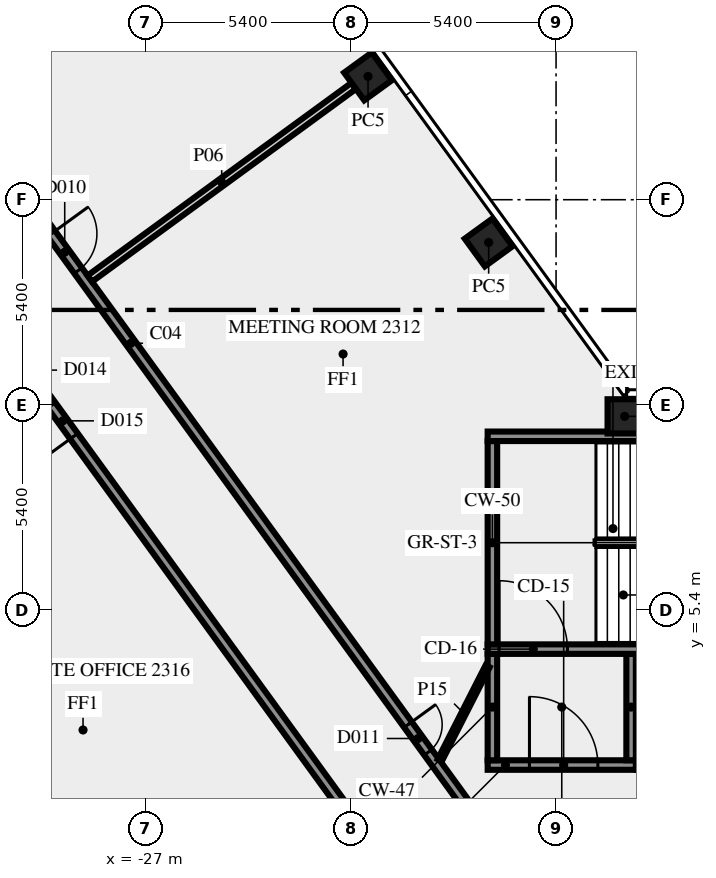
"""IFC4 building model, lengths in metres.
Left out: names, types, materials, properties, quantities, classifications, styles, units other than length and angle.
Written with IfcOpenShell. Run it as: python <this file> out.ifc"""

import sys

from ifc_helpers import new_model, si_unit, direction, frame, frame_2d, origin, origin_2d, place, context, subcontext, project, spatial, rectangle, extrude, element, fill, save


model = new_model("IFC4")
c1 = context("Model", 3, precision=1e-05, world=origin(), true_north=direction((0.0, 1.0)))
c2 = subcontext(c1, "Body", "Model", "MODEL_VIEW")
j1 = project(units=[si_unit("LENGTHUNIT", "METRE"), si_unit("PLANEANGLEUNIT", "RADIAN")], contexts=[c1])
p1 = place(None, origin())
s1 = spatial("IfcSite", under=j1, at=p1, CompositionType="ELEMENT")
p2 = place(p1, origin())
s2 = spatial("IfcBuilding", under=s1, at=p2, CompositionType="ELEMENT")
p3 = place(p2, frame((0.0, 0.0, 101.0)))
s3 = spatial("IfcBuildingStorey", under=s2, at=p3, CompositionType="ELEMENT", Elevation=101.0)
for number, where, z_axis, x_axis in (
    (1, (-17.974, 15.075, 0.0), (0.0, 0.0, 1.0), (-0.588, 0.809, 0.0)),
    (2, (-21.147, 19.444, 0.0), (0.0, 0.0, 1.0), (-0.588, 0.809, 0.0)),
    (3, (-14.395, 10.5, 0.0), (0.0, 0.0, 1.0), (-1.0, 0.0, 0.0)),
):
    element("IfcColumn", number, at=place(p3, frame(where, z_axis=z_axis, x_axis=x_axis)), inside=s3, PredefinedType="COLUMN", context=c2, shape_type="SweptSolid", body=[
        extrude(rectangle(XDim=0.9, YDim=0.9, at=origin_2d()), origin(), (0.0, 0.0, 1.0), 3.65),
    ])
p4 = place(p3, frame((-18.0, 1.325, 0.0), z_axis=(0.0, 0.0, 1.0), x_axis=(1.0, 0.0, 0.0)))
e4 = element("IfcWall", 4, at=p4, inside=s3, PredefinedType="SHEAR", context=c2, shape_type="SweptSolid", body=[
    extrude(rectangle(XDim=3.9, YDim=0.25, at=frame_2d((1.95, 0.0))), origin(), (0.0, 0.0, 1.0), 3.65),
])
p5 = place(p4, frame((1.1, 0.0, 0.0)))
e5 = element("IfcOpeningElement", 5, at=p5, cuts=e4, PredefinedType="OPENING", context=c2, shape_type="SweptSolid", body=[
    extrude(rectangle(XDim=1.8, YDim=2.1, at=frame_2d((0.9, 1.05))), frame((0.0, 0.135, 0.0), z_axis=(0.0, -1.0, 0.0), x_axis=(1.0, 0.0, 0.0)), (0.0, 0.0, 1.0), 0.27),
])
for number, where, z_axis, x_axis in (
    (6, (-17.875, 1.45, 0.0), (0.0, 0.0, 1.0), (0.0, 1.0, 0.0)),
    (7, (-14.225, 1.45, 0.0), (0.0, 0.0, 1.0), (0.0, 1.0, 0.0)),
):
    element("IfcWall", number, at=place(p3, frame(where, z_axis=z_axis, x_axis=x_axis)), inside=s3, PredefinedType="SHEAR", context=c2, shape_type="SweptSolid", body=[
        extrude(rectangle(XDim=2.8, YDim=0.25, at=frame_2d((1.4, 0.0))), origin(), (0.0, 0.0, 1.0), 3.65),
    ])
p6 = place(p3, frame((-18.0, 4.375, 0.0), z_axis=(0.0, 0.0, 1.0), x_axis=(1.0, 0.0, 0.0)))
e8 = element("IfcWall", 8, at=p6, inside=s3, PredefinedType="SHEAR", context=c2, shape_type="SweptSolid", body=[
    extrude(rectangle(XDim=10.5, YDim=0.25, at=frame_2d((5.25, 0.0))), origin(), (0.0, 0.0, 1.0), 3.65),
])
p7 = place(p6, frame((0.3, 0.0, 0.0)))
e9 = element("IfcOpeningElement", 9, at=p7, cuts=e8, PredefinedType="OPENING", context=c2, shape_type="SweptSolid", body=[
    extrude(rectangle(XDim=1.8, YDim=2.1, at=frame_2d((0.9, 1.05))), frame((0.0, 0.135, 0.0), z_axis=(0.0, -1.0, 0.0), x_axis=(1.0, 0.0, 0.0)), (0.0, 0.0, 1.0), 0.27),
])
p8 = place(p3, frame((-17.875, 4.5, 0.0), z_axis=(0.0, 0.0, 1.0), x_axis=(0.0, 1.0, 0.0)))
e10 = element("IfcWall", 10, at=p8, inside=s3, PredefinedType="SHEAR", context=c2, shape_type="SweptSolid", body=[
    extrude(rectangle(XDim=5.35, YDim=0.25, at=frame_2d((2.675, 0.0))), origin(), (0.0, 0.0, 1.0), 3.65),
])
p9 = place(p3, frame((-18.0, 9.975, 0.0), z_axis=(0.0, 0.0, 1.0), x_axis=(1.0, 0.0, 0.0)))
e11 = element("IfcWall", 11, at=p9, inside=s3, PredefinedType="SHEAR", context=c2, shape_type="SweptSolid", body=[
    extrude(rectangle(XDim=10.5, YDim=0.25, at=frame_2d((5.25, 0.0))), origin(), (0.0, 0.0, 1.0), 3.65),
])
p10 = place(p9, frame((4.5, 0.0, 1.0)))
e12 = element("IfcOpeningElement", 12, at=p10, cuts=e11, PredefinedType="OPENING", context=c2, shape_type="SweptSolid", body=[
    extrude(rectangle(XDim=1.2, YDim=1.2, at=frame_2d((0.6, 0.6))), frame((0.0, 0.135, 0.0), z_axis=(0.0, -1.0, 0.0), x_axis=(1.0, 0.0, 0.0)), (0.0, 0.0, 1.0), 0.27),
])
p11 = place(p3, frame((-20.531, -1.523, 0.0), z_axis=(0.0, 0.0, 1.0), x_axis=(-0.587784593204, 0.809017473231, 0.0)))
e13 = element("IfcWall", 13, at=p11, inside=s3, PredefinedType="SOLIDWALL", context=c2, shape_type="SweptSolid", body=[
    extrude(rectangle(XDim=44.67, YDim=0.25, at=frame_2d((22.335, 0.0))), origin(), (0.0, 0.0, 1.0), 3.65),
])
p12 = place(p11, frame((43.296, 0.0, 0.0)))
e14 = element("IfcOpeningElement", 14, at=p12, cuts=e13, PredefinedType="OPENING", context=c2, shape_type="SweptSolid", body=[
    extrude(rectangle(XDim=0.9, YDim=2.1, at=frame_2d((0.45, 1.05))), frame((0.0, 0.135, 0.0), z_axis=(0.0, -1.0, 0.0), x_axis=(1.0, 0.0, 0.0)), (0.0, 0.0, 1.0), 0.27),
])
p13 = place(p11, frame((15.916, 0.0, 0.0)))
e15 = element("IfcOpeningElement", 15, at=p13, cuts=e13, PredefinedType="OPENING", context=c2, shape_type="SweptSolid", body=[
    extrude(rectangle(XDim=0.9, YDim=2.1, at=frame_2d((0.45, 1.05))), frame((0.0, 0.135, 0.0), z_axis=(0.0, -1.0, 0.0), x_axis=(1.0, 0.0, 0.0)), (0.0, 0.0, 1.0), 0.27),
])
p14 = place(p11, frame((33.116, 0.0, 0.0)))
e16 = element("IfcOpeningElement", 16, at=p14, cuts=e13, PredefinedType="OPENING", context=c2, shape_type="SweptSolid", body=[
    extrude(rectangle(XDim=1.0, YDim=2.1, at=frame_2d((0.5, 1.05))), frame((0.0, 0.135, 0.0), z_axis=(0.0, -1.0, 0.0), x_axis=(1.0, 0.0, 0.0)), (0.0, 0.0, 1.0), 0.27),
])
p15 = place(p11, frame((14.216, 0.0, 0.0)))
e17 = element("IfcOpeningElement", 17, at=p15, cuts=e13, PredefinedType="OPENING", context=c2, shape_type="SweptSolid", body=[
    extrude(rectangle(XDim=1.0, YDim=2.1, at=frame_2d((0.5, 1.05))), frame((0.0, 0.135, 0.0), z_axis=(0.0, -1.0, 0.0), x_axis=(1.0, 0.0, 0.0)), (0.0, 0.0, 1.0), 0.27),
])
p16 = place(p3, frame((-37.232, 25.972, 0.0), z_axis=(0.0, 0.0, 1.0), x_axis=(0.587786323093, -0.809016216391, 0.0)))
e18 = element("IfcWall", 18, at=p16, inside=s3, PredefinedType="SOLIDWALL", context=c2, shape_type="SweptSolid", body=[
    extrude(rectangle(XDim=33.493, YDim=0.25, at=frame_2d((16.747, 0.0))), origin(), (0.0, 0.0, 1.0), 3.65),
])
p17 = place(p16, frame((13.185, 0.0, 0.0)))
e19 = element("IfcOpeningElement", 19, at=p17, cuts=e18, PredefinedType="OPENING", context=c2, shape_type="SweptSolid", body=[
    extrude(rectangle(XDim=1.2, YDim=2.1, at=frame_2d((0.6, 1.05))), frame((0.0, 0.135, 0.0), z_axis=(0.0, -1.0, 0.0), x_axis=(1.0, 0.0, 0.0)), (0.0, 0.0, 1.0), 0.27),
])
p18 = place(p16, frame((29.152, 0.0, 0.0)))
e20 = element("IfcOpeningElement", 20, at=p18, cuts=e18, PredefinedType="OPENING", context=c2, shape_type="SweptSolid", body=[
    extrude(rectangle(XDim=0.9, YDim=2.1, at=frame_2d((0.45, 1.05))), frame((0.0, 0.135, 0.0), z_axis=(0.0, -1.0, 0.0), x_axis=(1.0, 0.0, 0.0)), (0.0, 0.0, 1.0), 0.27),
])
p19 = place(p3, frame((-28.469, 14.124, 0.0), z_axis=(0.0, 0.0, 1.0), x_axis=(0.807597163234, 0.589734535139, 0.0)))
e21 = element("IfcWall", 21, at=p19, inside=s3, PredefinedType="SOLIDWALL", context=c2, shape_type="SweptSolid", body=[
    extrude(rectangle(XDim=8.595, YDim=0.2, at=frame_2d((4.298, 0.0))), origin(), (0.0, 0.0, 1.0), 3.65),
])
p20 = place(p3, frame((-19.261, 1.45, 0.0), z_axis=(0.0, 0.0, 1.0), x_axis=(0.453950796792, 0.891026752736, 0.0)))
e22 = element("IfcWall", 22, at=p20, inside=s3, PredefinedType="PARTITIONING", context=c2, shape_type="SweptSolid", body=[
    extrude(rectangle(XDim=2.778, YDim=0.12, at=frame_2d((1.389, 0.0))), origin(), (0.0, 0.0, 1.0), 3.65),
])
p21 = place(p5, origin())
e23 = element("IfcDoor", 23, at=p21, inside=s3, OperationType="DOUBLE_DOOR_SINGLE_SWING", PredefinedType="DOOR", context=c2, shape_type="SweptSolid", body=[
    extrude(rectangle(XDim=1.8, YDim=2.1, at=frame_2d((0.9, 1.05))), frame((0.0, 0.025, 0.0), z_axis=(0.0, -1.0, 0.0), x_axis=(1.0, 0.0, 0.0)), (0.0, 0.0, 1.0), 0.05),
])
fill(e5, e23)
p22 = place(p7, origin())
e24 = element("IfcDoor", 24, at=p22, inside=s3, OperationType="DOUBLE_DOOR_SINGLE_SWING", PredefinedType="DOOR", context=c2, shape_type="SweptSolid", body=[
    extrude(rectangle(XDim=1.8, YDim=2.1, at=frame_2d((0.9, 1.05))), frame((0.0, 0.025, 0.0), z_axis=(0.0, -1.0, 0.0), x_axis=(1.0, 0.0, 0.0)), (0.0, 0.0, 1.0), 0.05),
])
fill(e9, e24)
p23 = place(p17, origin())
e25 = element("IfcDoor", 25, at=p23, inside=s3, OperationType="SINGLE_SWING_RIGHT", PredefinedType="DOOR", context=c2, shape_type="SweptSolid", body=[
    extrude(rectangle(XDim=1.2, YDim=2.1, at=frame_2d((0.6, 1.05))), frame((0.0, 0.025, 0.0), z_axis=(0.0, -1.0, 0.0), x_axis=(1.0, 0.0, 0.0)), (0.0, 0.0, 1.0), 0.05),
])
fill(e19, e25)
p24 = place(p15, origin())
e26 = element("IfcDoor", 26, at=p24, inside=s3, OperationType="SINGLE_SWING_RIGHT", PredefinedType="DOOR", context=c2, shape_type="SweptSolid", body=[
    extrude(rectangle(XDim=1.0, YDim=2.1, at=frame_2d((0.5, 1.05))), frame((0.0, 0.025, 0.0), z_axis=(0.0, -1.0, 0.0), x_axis=(1.0, 0.0, 0.0)), (0.0, 0.0, 1.0), 0.05),
])
fill(e17, e26)
p25 = place(p18, origin())
e27 = element("IfcDoor", 27, at=p25, inside=s3, OperationType="SINGLE_SWING_RIGHT", PredefinedType="DOOR", context=c2, shape_type="SweptSolid", body=[
    extrude(rectangle(XDim=0.9, YDim=2.1, at=frame_2d((0.45, 1.05))), frame((0.0, 0.025, 0.0), z_axis=(0.0, -1.0, 0.0), x_axis=(1.0, 0.0, 0.0)), (0.0, 0.0, 1.0), 0.05),
])
fill(e20, e27)
save(model, sys.argv[1])
